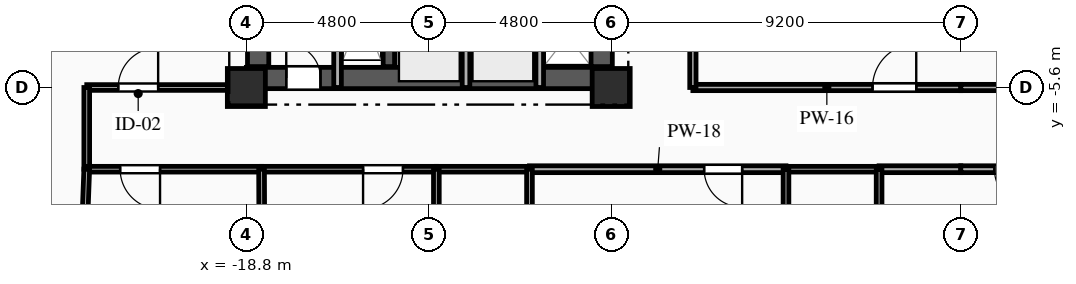
"""IFC4 building model, lengths in metres.
Left out: names, types, materials, properties, quantities, classifications, styles, units other than length and angle.
Written with IfcOpenShell. Run it as: python <this file> out.ifc"""

import sys

from ifc_helpers import new_model, si_unit, direction, frame, frame_2d, origin, origin_2d, place, context, subcontext, project, spatial, rectangle, extrude, element, fill, save


model = new_model("IFC4")
c1 = context("Model", 3, precision=1e-05, world=origin(), true_north=direction((0.0, 1.0)))
c2 = subcontext(c1, "Body", "Model", "MODEL_VIEW")
j1 = project(units=[si_unit("LENGTHUNIT", "METRE"), si_unit("PLANEANGLEUNIT", "RADIAN")], contexts=[c1])
p1 = place(None, origin())
s1 = spatial("IfcSite", under=j1, at=p1, CompositionType="ELEMENT")
p2 = place(p1, origin())
s2 = spatial("IfcBuilding", under=s1, at=p2, CompositionType="ELEMENT")
p3 = place(p2, frame((0.0, 0.0, 79.0)))
s3 = spatial("IfcBuildingStorey", under=s2, at=p3, CompositionType="ELEMENT", Elevation=79.0)
for number, where, z_axis, x_axis in (
    (1, (-18.8, -5.6, 0.0), (0.0, 0.0, 1.0), (1.0, 0.0, 0.0)),
    (2, (-9.2, -5.6, 0.0), (0.0, 0.0, 1.0), (1.0, 0.0, 0.0)),
):
    element("IfcColumn", number, at=place(p3, frame(where, z_axis=z_axis, x_axis=x_axis)), inside=s3, PredefinedType="COLUMN", context=c2, shape_type="SweptSolid", body=[
        extrude(rectangle(XDim=1.0, YDim=1.0, at=origin_2d()), origin(), (0.0, 0.0, 1.0), 3.35),
    ])
p4 = place(p3, frame((-18.8, -5.35, 0.0), z_axis=(0.0, 0.0, 1.0), x_axis=(1.0, 0.0, 0.0)))
e3 = element("IfcWall", 3, at=p4, inside=s3, PredefinedType="SHEAR", context=c2, shape_type="SweptSolid", body=[
    extrude(rectangle(XDim=9.6, YDim=0.56, at=frame_2d((4.8, 0.0))), origin(), (0.0, 0.0, 1.0), 3.045),
])
p5 = place(p4, frame((1.05, 0.0, 0.0)))
e4 = element("IfcOpeningElement", 4, at=p5, cuts=e3, PredefinedType="OPENING", context=c2, shape_type="SweptSolid", body=[
    extrude(rectangle(XDim=0.9, YDim=2.1, at=frame_2d((0.45, 1.05))), frame((0.0, 0.29, 0.0), z_axis=(0.0, -1.0, 0.0), x_axis=(1.0, 0.0, 0.0)), (0.0, 0.0, 1.0), 0.58),
])
p6 = place(p3, frame((-18.49, -5.05, 0.0), z_axis=(0.0, 0.0, 1.0), x_axis=(0.0, 1.0, 0.0)))
e5 = element("IfcWall", 5, at=p6, inside=s3, PredefinedType="SHEAR", context=c2, shape_type="SweptSolid", body=[
    extrude(rectangle(XDim=10.1, YDim=0.56, at=frame_2d((5.05, 0.0))), origin(), (0.0, 0.0, 1.0), 3.045),
])
p7 = place(p3, frame((-9.45, -5.05, 0.0), z_axis=(0.0, 0.0, 1.0), x_axis=(0.0, 1.0, 0.0)))
e6 = element("IfcWall", 6, at=p7, inside=s3, PredefinedType="SHEAR", context=c2, shape_type="SweptSolid", body=[
    extrude(rectangle(XDim=10.1, YDim=0.56, at=frame_2d((5.05, 0.0))), origin(), (0.0, 0.0, 1.0), 3.045),
])
p8 = place(p7, frame((7.15, 0.0, 0.0)))
e7 = element("IfcOpeningElement", 7, at=p8, cuts=e6, PredefinedType="OPENING", context=c2, shape_type="SweptSolid", body=[
    extrude(rectangle(XDim=0.9, YDim=2.1, at=frame_2d((0.45, 1.05))), frame((0.0, 0.29, 0.0), z_axis=(0.0, -1.0, 0.0), x_axis=(1.0, 0.0, 0.0)), (0.0, 0.0, 1.0), 0.58),
])
p9 = place(p7, frame((2.4, 0.0, 0.0)))
e8 = element("IfcOpeningElement", 8, at=p9, cuts=e6, PredefinedType="OPENING", context=c2, shape_type="SweptSolid", body=[
    extrude(rectangle(XDim=1.2, YDim=2.15, at=frame_2d((0.6, 1.075))), frame((0.0, 0.29, 0.0), z_axis=(0.0, -1.0, 0.0), x_axis=(1.0, 0.0, 0.0)), (0.0, 0.0, 1.0), 0.58),
])
p10 = place(p3, frame((-15.05, -5.05, 0.0), z_axis=(0.0, 0.0, 1.0), x_axis=(0.0, 1.0, 0.0)))
e9 = element("IfcWall", 9, at=p10, inside=s3, PredefinedType="SHEAR", context=c2, shape_type="SweptSolid", body=[
    extrude(rectangle(XDim=10.1, YDim=0.3, at=frame_2d((5.05, 0.0))), origin(), (0.0, 0.0, 1.0), 3.045),
])
p11 = place(p3, frame((-16.4, -5.6, 0.0), z_axis=(0.0, 0.0, 1.0), x_axis=(0.0, 1.0, 0.0)))
e10 = element("IfcWall", 10, at=p11, inside=s3, PredefinedType="PARTITIONING", context=c2, shape_type="SweptSolid", body=[
    extrude(rectangle(XDim=3.49, YDim=0.2, at=frame_2d((1.745, 0.0))), origin(), (0.0, 0.0, 1.0), 3.045),
])
for number, where, z_axis, x_axis in (
    (11, (-13.02, -5.6, 0.0), (0.0, 0.0, 1.0), (0.0, 1.0, 0.0)),
    (12, (-11.08, -5.6, 0.0), (0.0, 0.0, 1.0), (0.0, 1.0, 0.0)),
):
    element("IfcWall", number, at=place(p3, frame(where, z_axis=z_axis, x_axis=x_axis)), inside=s3, PredefinedType="PARTITIONING", context=c2, shape_type="SweptSolid", body=[
        extrude(rectangle(XDim=2.25, YDim=0.2, at=frame_2d((1.125, 0.0))), origin(), (0.0, 0.0, 1.0), 3.045),
    ])
p12 = place(p3, frame((-23.0, -5.6, 0.0), z_axis=(0.0, 0.0, 1.0), x_axis=(1.0, 0.0, 0.0)))
e13 = element("IfcWall", 13, at=p12, inside=s3, PredefinedType="PARTITIONING", context=c2, shape_type="SweptSolid", body=[
    extrude(rectangle(XDim=4.2, YDim=0.15, at=frame_2d((2.1, 0.0))), origin(), (0.0, 0.0, 1.0), 3.045),
])
p13 = place(p12, frame((0.829, 0.0, 0.0)))
e14 = element("IfcOpeningElement", 14, at=p13, cuts=e13, PredefinedType="OPENING", context=c2, shape_type="SweptSolid", body=[
    extrude(rectangle(XDim=1.05, YDim=2.15, at=frame_2d((0.525, 1.075))), frame((0.0, 0.085, 0.0), z_axis=(0.0, -1.0, 0.0), x_axis=(1.0, 0.0, 0.0)), (0.0, 0.0, 1.0), 0.17),
])
p14 = place(p3, frame((-23.0, -7.75, 0.0), z_axis=(0.0, 0.0, 1.0), x_axis=(0.0, 1.0, 0.0)))
e15 = element("IfcWall", 15, at=p14, inside=s3, PredefinedType="PARTITIONING", context=c2, shape_type="SweptSolid", body=[
    extrude(rectangle(XDim=2.15, YDim=0.15, at=frame_2d((1.075, 0.0))), origin(), (0.0, 0.0, 1.0), 2.7),
])
p15 = place(p3, frame((-18.4, -7.75, 0.0), z_axis=(0.0, 0.0, 1.0), x_axis=(-1.0, 0.0, 0.0)))
e16 = element("IfcWall", 16, at=p15, inside=s3, PredefinedType="PARTITIONING", context=c2, shape_type="SweptSolid", body=[
    extrude(rectangle(XDim=4.6, YDim=0.15, at=frame_2d((2.3, 0.0))), origin(), (0.0, 0.0, 1.0), 3.045),
])
p16 = place(p15, frame((2.671, 0.0, 0.0)))
e17 = element("IfcOpeningElement", 17, at=p16, cuts=e16, PredefinedType="OPENING", context=c2, shape_type="SweptSolid", body=[
    extrude(rectangle(XDim=1.05, YDim=2.15, at=frame_2d((0.525, 1.075))), frame((0.0, 0.085, 0.0), z_axis=(0.0, -1.0, 0.0), x_axis=(1.0, 0.0, 0.0)), (0.0, 0.0, 1.0), 0.17),
])
p17 = place(p3, frame((-13.8, -7.75, 0.0), z_axis=(0.0, 0.0, 1.0), x_axis=(-1.0, 0.0, 0.0)))
e18 = element("IfcWall", 18, at=p17, inside=s3, PredefinedType="PARTITIONING", context=c2, shape_type="SweptSolid", body=[
    extrude(rectangle(XDim=4.6, YDim=0.15, at=frame_2d((2.3, 0.0))), origin(), (0.0, 0.0, 1.0), 3.045),
])
p18 = place(p17, frame((0.879, 0.0, 0.0)))
e19 = element("IfcOpeningElement", 19, at=p18, cuts=e18, PredefinedType="OPENING", context=c2, shape_type="SweptSolid", body=[
    extrude(rectangle(XDim=1.05, YDim=2.15, at=frame_2d((0.525, 1.075))), frame((0.0, 0.085, 0.0), z_axis=(0.0, -1.0, 0.0), x_axis=(1.0, 0.0, 0.0)), (0.0, 0.0, 1.0), 0.17),
])
p19 = place(p3, frame((-4.6, -7.75, 0.0), z_axis=(0.0, 0.0, 1.0), x_axis=(-1.0, 0.0, 0.0)))
e20 = element("IfcWall", 20, at=p19, inside=s3, PredefinedType="PARTITIONING", context=c2, shape_type="SweptSolid", body=[
    extrude(rectangle(XDim=6.75, YDim=0.18, at=frame_2d((3.375, 0.0))), origin(), (0.0, 0.0, 1.0), 3.045),
])
p20 = place(p19, frame((1.154, 0.0, 0.0)))
e21 = element("IfcOpeningElement", 21, at=p20, cuts=e20, PredefinedType="OPENING", context=c2, shape_type="SweptSolid", body=[
    extrude(rectangle(XDim=1.0, YDim=2.15, at=frame_2d((0.5, 1.075))), frame((0.0, 0.1, 0.0), z_axis=(0.0, -1.0, 0.0), x_axis=(1.0, 0.0, 0.0)), (0.0, 0.0, 1.0), 0.2),
])
p21 = place(p3, frame((-11.35, -7.75, 0.0), z_axis=(0.0, 0.0, 1.0), x_axis=(-1.0, 0.0, 0.0)))
e22 = element("IfcWall", 22, at=p21, inside=s3, PredefinedType="PLUMBINGWALL", context=c2, shape_type="SweptSolid", body=[
    extrude(rectangle(XDim=2.45, YDim=0.15, at=frame_2d((1.225, 0.0))), origin(), (0.0, 0.0, 1.0), 3.045),
])
p22 = place(p3, frame((0.0, -7.75, 0.0), z_axis=(0.0, 0.0, 1.0), x_axis=(-1.0, 0.0, 0.0)))
e23 = element("IfcWall", 23, at=p22, inside=s3, PredefinedType="PARTITIONING", context=c2, shape_type="SweptSolid", body=[
    extrude(rectangle(XDim=2.15, YDim=0.18, at=frame_2d((1.075, 0.0))), origin(), (0.0, 0.0, 1.0), 3.045),
])
p23 = place(p3, frame((-2.15, -7.75, 0.0), z_axis=(0.0, 0.0, 1.0), x_axis=(-1.0, 0.0, 0.0)))
e24 = element("IfcWall", 24, at=p23, inside=s3, PredefinedType="PLUMBINGWALL", context=c2, shape_type="SweptSolid", body=[
    extrude(rectangle(XDim=2.45, YDim=0.15, at=frame_2d((1.225, 0.0))), origin(), (0.0, 0.0, 1.0), 3.045),
])
p24 = place(p3, frame((-7.05, -5.6, 0.0), z_axis=(0.0, 0.0, 1.0), x_axis=(1.0, 0.0, 0.0)))
e25 = element("IfcWall", 25, at=p24, inside=s3, PredefinedType="PARTITIONING", context=c2, shape_type="SweptSolid", body=[
    extrude(rectangle(XDim=7.05, YDim=0.165, at=frame_2d((3.525, 0.0))), origin(), (0.0, 0.0, 1.0), 2.53),
])
p25 = place(p24, frame((4.728, 0.0, 0.0)))
e26 = element("IfcOpeningElement", 26, at=p25, cuts=e25, PredefinedType="OPENING", context=c2, shape_type="SweptSolid", body=[
    extrude(rectangle(XDim=1.15, YDim=2.15, at=frame_2d((0.575, 1.075))), frame((0.0, 0.093, 0.0), z_axis=(0.0, -1.0, 0.0), x_axis=(1.0, 0.0, 0.0)), (0.0, 0.0, 1.0), 0.185),
])
p26 = place(p3, frame((4.6, -7.75, 0.0), z_axis=(0.0, 0.0, 1.0), x_axis=(-1.0, 0.0, 0.0)))
e27 = element("IfcWall", 27, at=p26, inside=s3, PredefinedType="PARTITIONING", context=c2, shape_type="SweptSolid", body=[
    extrude(rectangle(XDim=4.6, YDim=0.18, at=frame_2d((2.3, 0.0))), origin(), (0.0, 0.0, 1.0), 3.045),
])
p27 = place(p26, frame((2.715, 0.0, 0.0)))
e28 = element("IfcOpeningElement", 28, at=p27, cuts=e27, PredefinedType="OPENING", context=c2, shape_type="SweptSolid", body=[
    extrude(rectangle(XDim=1.0, YDim=2.15, at=frame_2d((0.5, 1.075))), frame((0.0, 0.1, 0.0), z_axis=(0.0, -1.0, 0.0), x_axis=(1.0, 0.0, 0.0)), (0.0, 0.0, 1.0), 0.2),
])
p28 = place(p3, frame((0.0, -5.6, 0.0), z_axis=(0.0, 0.0, 1.0), x_axis=(1.0, 0.0, 0.0)))
e29 = element("IfcWall", 29, at=p28, inside=s3, PredefinedType="PARTITIONING", context=c2, shape_type="SweptSolid", body=[
    extrude(rectangle(XDim=7.05, YDim=0.165, at=frame_2d((3.525, 0.0))), origin(), (0.0, 0.0, 1.0), 2.53),
])
p29 = place(p3, frame((-7.05, 1.45, 0.0), z_axis=(0.0, 0.0, 1.0), x_axis=(0.0, -1.0, 0.0)))
e30 = element("IfcWall", 30, at=p29, inside=s3, PredefinedType="PARTITIONING", context=c2, shape_type="SweptSolid", body=[
    extrude(rectangle(XDim=7.05, YDim=0.165, at=frame_2d((3.525, 0.0))), origin(), (0.0, 0.0, 1.0), 3.045),
])
p30 = place(p3, frame((-23.0, -7.75, 0.0), z_axis=(0.0, 0.0, 1.0), x_axis=(-0.036924695214, -0.999318050914, 0.0)))
e31 = element("IfcWall", 31, at=p30, inside=s3, PredefinedType="PARTITIONING", context=c2, shape_type="SweptSolid", body=[
    extrude(rectangle(XDim=10.176, YDim=0.15, at=frame_2d((5.088, 0.0))), origin(), (0.0, 0.0, 1.0), 3.045),
])
p31 = place(p3, frame((-18.4, -7.75, 0.0), z_axis=(0.0, 0.0, 1.0), x_axis=(0.003850096217, -0.999992588352, 0.0)))
e32 = element("IfcWall", 32, at=p31, inside=s3, PredefinedType="PARTITIONING", context=c2, shape_type="SweptSolid", body=[
    extrude(rectangle(XDim=11.351, YDim=0.15, at=frame_2d((5.675, 0.0))), origin(), (0.0, 0.0, 1.0), 3.045),
])
for number, where, z_axis, x_axis in (
    (33, (-13.8, -7.75, 0.0), (0.0, 0.0, 1.0), (0.0, -1.0, 0.0)),
    (34, (-11.35, -9.9, 0.0), (0.0, 0.0, 1.0), (0.0, 1.0, 0.0)),
    (35, (-4.6, -7.75, 0.0), (0.0, 0.0, 1.0), (0.0, -1.0, 0.0)),
    (36, (-2.15, -9.9, 0.0), (0.0, 0.0, 1.0), (0.0, 1.0, 0.0)),
):
    element("IfcWall", number, at=place(p3, frame(where, z_axis=z_axis, x_axis=x_axis)), inside=s3, PredefinedType="PLUMBINGWALL", context=c2, shape_type="SweptSolid", body=[
        extrude(rectangle(XDim=2.15, YDim=0.15, at=frame_2d((1.075, 0.0))), origin(), (0.0, 0.0, 1.0), 3.045),
    ])
p32 = place(p5, origin())
e37 = element("IfcDoor", 37, at=p32, inside=s3, OperationType="SINGLE_SWING_LEFT", PredefinedType="DOOR", context=c2, shape_type="SweptSolid", body=[
    extrude(rectangle(XDim=0.9, YDim=2.1, at=frame_2d((0.45, 1.05))), frame((0.0, 0.025, 0.0), z_axis=(0.0, -1.0, 0.0), x_axis=(1.0, 0.0, 0.0)), (0.0, 0.0, 1.0), 0.05),
])
fill(e4, e37)
p33 = place(p13, origin())
e38 = element("IfcDoor", 38, at=p33, inside=s3, OperationType="SINGLE_SWING_RIGHT", PredefinedType="DOOR", context=c2, shape_type="SweptSolid", body=[
    extrude(rectangle(XDim=1.05, YDim=2.15, at=frame_2d((0.525, 1.075))), frame((0.0, 0.025, 0.0), z_axis=(0.0, -1.0, 0.0), x_axis=(1.0, 0.0, 0.0)), (0.0, 0.0, 1.0), 0.05),
])
fill(e14, e38)
p34 = place(p16, origin())
e39 = element("IfcDoor", 39, at=p34, inside=s3, OperationType="SINGLE_SWING_LEFT", PredefinedType="DOOR", context=c2, shape_type="SweptSolid", body=[
    extrude(rectangle(XDim=1.05, YDim=2.15, at=frame_2d((0.525, 1.075))), frame((0.0, 0.025, 0.0), z_axis=(0.0, -1.0, 0.0), x_axis=(1.0, 0.0, 0.0)), (0.0, 0.0, 1.0), 0.05),
])
fill(e17, e39)
p35 = place(p18, origin())
e40 = element("IfcDoor", 40, at=p35, inside=s3, OperationType="SINGLE_SWING_RIGHT", PredefinedType="DOOR", context=c2, shape_type="SweptSolid", body=[
    extrude(rectangle(XDim=1.05, YDim=2.15, at=frame_2d((0.525, 1.075))), frame((0.0, 0.025, 0.0), z_axis=(0.0, -1.0, 0.0), x_axis=(1.0, 0.0, 0.0)), (0.0, 0.0, 1.0), 0.05),
])
fill(e19, e40)
p36 = place(p20, origin())
e41 = element("IfcDoor", 41, at=p36, inside=s3, OperationType="SINGLE_SWING_LEFT", PredefinedType="DOOR", context=c2, shape_type="SweptSolid", body=[
    extrude(rectangle(XDim=1.0, YDim=2.15, at=frame_2d((0.5, 1.075))), frame((0.0, 0.025, 0.0), z_axis=(0.0, -1.0, 0.0), x_axis=(1.0, 0.0, 0.0)), (0.0, 0.0, 1.0), 0.05),
])
fill(e21, e41)
p37 = place(p25, origin())
e42 = element("IfcDoor", 42, at=p37, inside=s3, OperationType="SINGLE_SWING_RIGHT", PredefinedType="DOOR", context=c2, shape_type="SweptSolid", body=[
    extrude(rectangle(XDim=1.15, YDim=2.15, at=frame_2d((0.575, 1.075))), frame((0.0, 0.025, 0.0), z_axis=(0.0, -1.0, 0.0), x_axis=(1.0, 0.0, 0.0)), (0.0, 0.0, 1.0), 0.05),
])
fill(e26, e42)
p38 = place(p27, origin())
e43 = element("IfcDoor", 43, at=p38, inside=s3, OperationType="SINGLE_SWING_LEFT", PredefinedType="DOOR", context=c2, shape_type="SweptSolid", body=[
    extrude(rectangle(XDim=1.0, YDim=2.15, at=frame_2d((0.5, 1.075))), frame((0.0, 0.025, 0.0), z_axis=(0.0, -1.0, 0.0), x_axis=(1.0, 0.0, 0.0)), (0.0, 0.0, 1.0), 0.05),
])
fill(e28, e43)
save(model, sys.argv[1])
